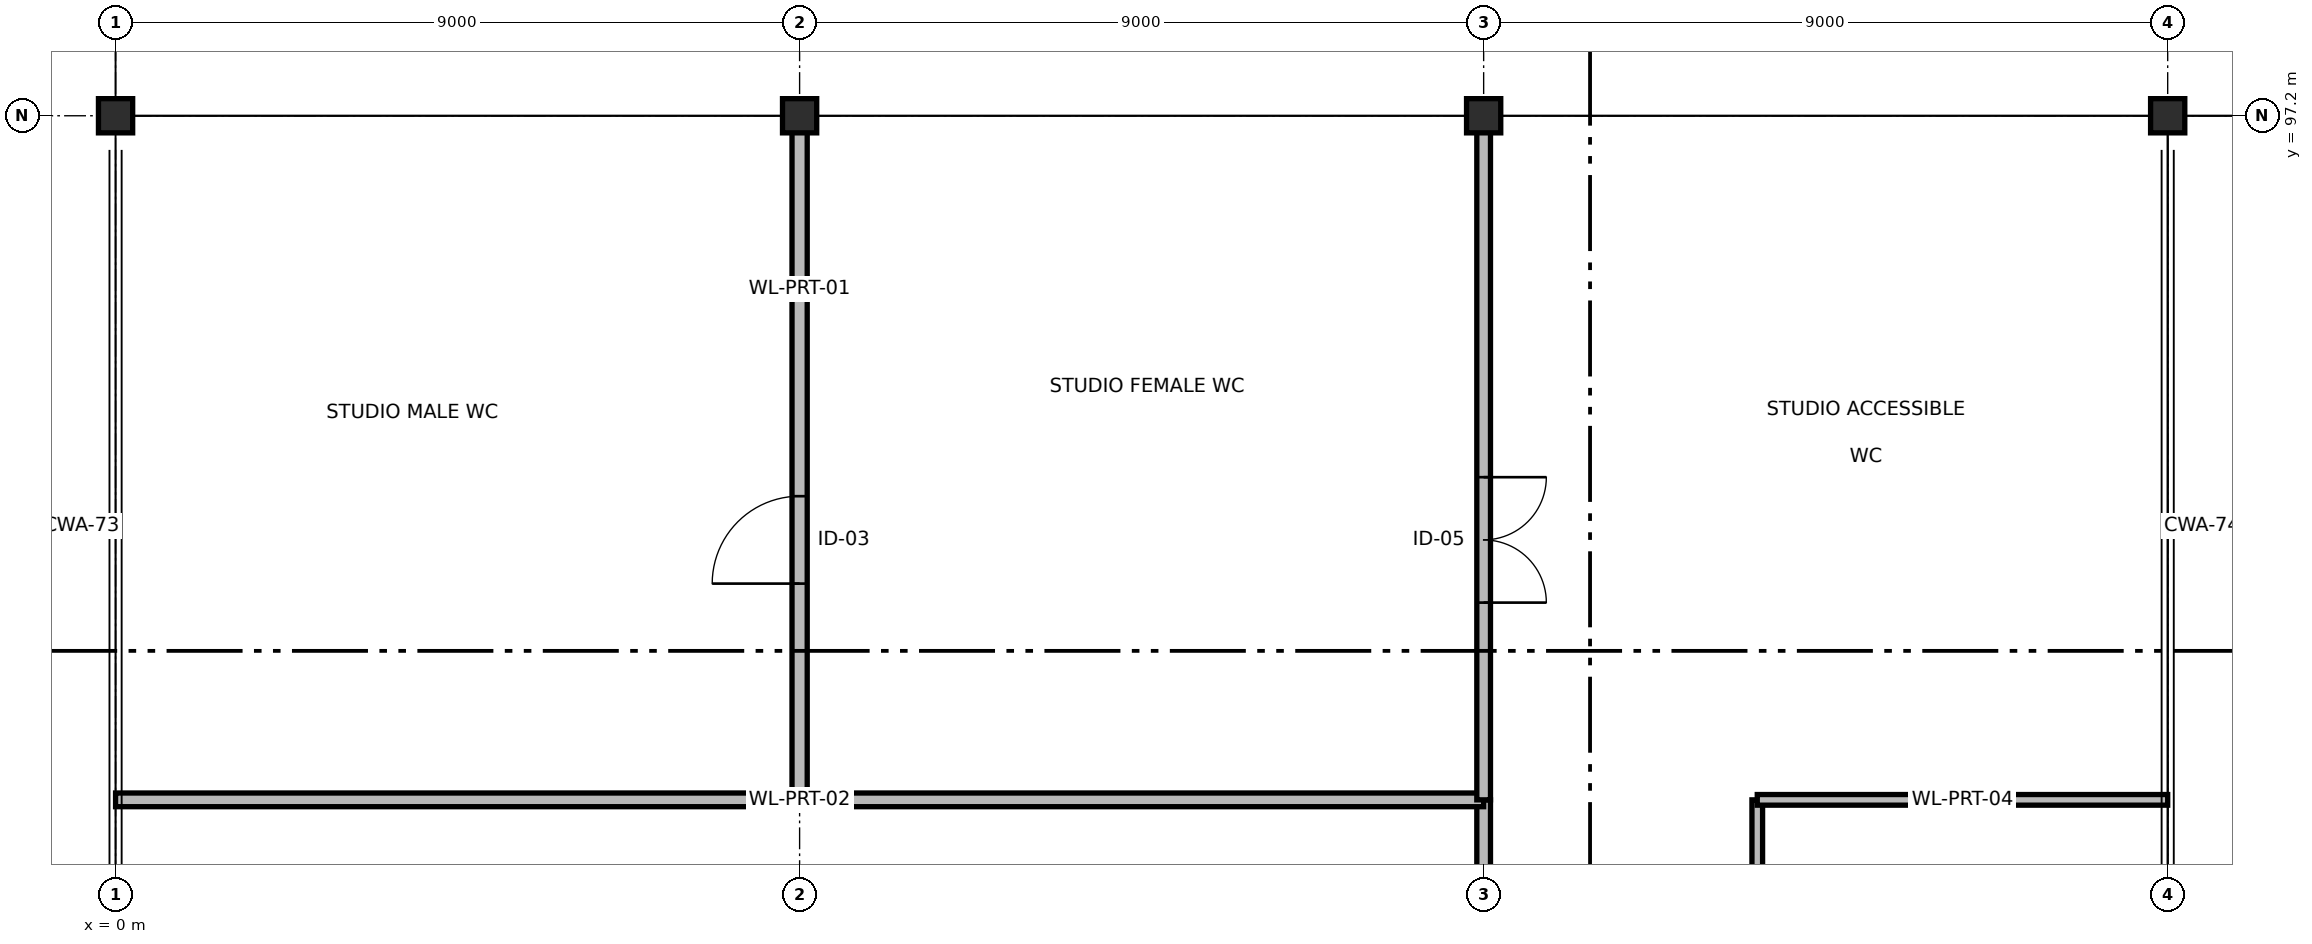
"""IFC4 building model, lengths in metres.
Left out: names, types, materials, properties, quantities, classifications, styles, units other than length and angle.
Written with IfcOpenShell. Run it as: python <this file> out.ifc"""

import sys

from ifc_helpers import new_model, si_unit, direction, frame, frame_2d, origin, origin_2d, place, context, subcontext, project, spatial, rectangle, extrude, element, fill, save


model = new_model("IFC4")
c1 = context("Model", 3, precision=1e-05, world=origin(), true_north=direction((0.0, 1.0)))
c2 = subcontext(c1, "Body", "Model", "MODEL_VIEW")
j1 = project(units=[si_unit("LENGTHUNIT", "METRE"), si_unit("PLANEANGLEUNIT", "RADIAN")], contexts=[c1])
p1 = place(None, origin())
s1 = spatial("IfcSite", under=j1, at=p1, CompositionType="ELEMENT")
p2 = place(p1, origin())
s2 = spatial("IfcBuilding", under=s1, at=p2, CompositionType="ELEMENT")
p3 = place(p2, frame((0.0, 0.0, 14.1)))
s3 = spatial("IfcBuildingStorey", under=s2, at=p3, CompositionType="ELEMENT", Elevation=14.1)
for number, where, z_axis, x_axis in (
    (1, (0.0, 97.2, 0.0), (0.0, 0.0, 1.0), (1.0, 0.0, 0.0)),
    (2, (9.0, 97.2, 0.0), (0.0, 0.0, 1.0), (1.0, 0.0, 0.0)),
    (3, (18.0, 97.2, 0.0), (0.0, 0.0, 1.0), (1.0, 0.0, 0.0)),
    (4, (27.0, 97.2, 0.0), (0.0, 0.0, 1.0), (1.0, 0.0, 0.0)),
):
    element("IfcColumn", number, at=place(p3, frame(where, z_axis=z_axis, x_axis=x_axis)), inside=s3, PredefinedType="COLUMN", context=c2, shape_type="SweptSolid", body=[
        extrude(rectangle(XDim=0.45, YDim=0.45, at=origin_2d()), origin(), (0.0, 0.0, 1.0), 4.5),
    ])
p4 = place(p3, frame((18.0, 68.4, 0.0), z_axis=(0.0, 0.0, 1.0), x_axis=(0.0, 1.0, 0.0)))
e5 = element("IfcWall", 5, at=p4, inside=s3, PredefinedType="PARTITIONING", context=c2, shape_type="SweptSolid", body=[
    extrude(rectangle(XDim=19.8, YDim=0.18, at=frame_2d((9.9, 0.0))), origin(), (0.0, 0.0, 1.0), 3.485),
])
p5 = place(p4, frame((3.856, 0.0, 0.0)))
e6 = element("IfcOpeningElement", 6, at=p5, cuts=e5, PredefinedType="OPENING", context=c2, shape_type="SweptSolid", body=[
    extrude(rectangle(XDim=1.0, YDim=2.1, at=frame_2d((0.5, 1.05))), frame((0.0, 0.1, 0.0), z_axis=(0.0, -1.0, 0.0), x_axis=(1.0, 0.0, 0.0)), (0.0, 0.0, 1.0), 0.2),
])
p6 = place(p3, frame((0.0, 88.2, 0.0), z_axis=(0.0, 0.0, 1.0), x_axis=(1.0, 0.0, 0.0)))
e7 = element("IfcWall", 7, at=p6, inside=s3, PredefinedType="PARTITIONING", context=c2, shape_type="SweptSolid", body=[
    extrude(rectangle(XDim=18.0, YDim=0.18, at=frame_2d((9.0, 0.0))), origin(), (0.0, 0.0, 1.0), 3.485),
])
p7 = place(p3, frame((21.6, 71.6, 0.0), z_axis=(0.0, 0.0, 1.0), x_axis=(0.0, 1.0, 0.0)))
e8 = element("IfcWall", 8, at=p7, inside=s3, PredefinedType="PARTITIONING", context=c2, shape_type="SweptSolid", body=[
    extrude(rectangle(XDim=16.6, YDim=0.14, at=frame_2d((8.3, 0.0))), origin(), (0.0, 0.0, 1.0), 3.585),
])
p8 = place(p7, frame((9.817, 0.0, 0.0)))
e9 = element("IfcOpeningElement", 9, at=p8, cuts=e8, PredefinedType="OPENING", context=c2, shape_type="SweptSolid", body=[
    extrude(rectangle(XDim=0.95, YDim=2.1, at=frame_2d((0.475, 1.05))), frame((0.0, 0.08, 0.0), z_axis=(0.0, -1.0, 0.0), x_axis=(1.0, 0.0, 0.0)), (0.0, 0.0, 1.0), 0.16),
])
p9 = place(p3, frame((21.6, 88.2, 0.0), z_axis=(0.0, 0.0, 1.0), x_axis=(1.0, 0.0, 0.0)))
e10 = element("IfcWall", 10, at=p9, inside=s3, PredefinedType="PARTITIONING", context=c2, shape_type="SweptSolid", body=[
    extrude(rectangle(XDim=5.4, YDim=0.14, at=frame_2d((2.7, 0.0))), origin(), (0.0, 0.0, 1.0), 3.535),
])
p10 = place(p3, frame((9.0, 88.2, 0.0), z_axis=(0.0, 0.0, 1.0), x_axis=(0.0, 1.0, 0.0)))
e11 = element("IfcWall", 11, at=p10, inside=s3, PredefinedType="PARTITIONING", context=c2, shape_type="SweptSolid", body=[
    extrude(rectangle(XDim=9.0, YDim=0.2, at=frame_2d((4.5, 0.0))), origin(), (0.0, 0.0, 1.0), 3.485),
])
p11 = place(p10, frame((2.845, 0.0, 0.0)))
e12 = element("IfcOpeningElement", 12, at=p11, cuts=e11, PredefinedType="OPENING", context=c2, shape_type="SweptSolid", body=[
    extrude(rectangle(XDim=1.15, YDim=2.2, at=frame_2d((0.575, 1.1))), frame((0.0, 0.11, 0.0), z_axis=(0.0, -1.0, 0.0), x_axis=(1.0, 0.0, 0.0)), (0.0, 0.0, 1.0), 0.22),
])
p12 = place(p3, frame((18.0, 88.2, 0.0), z_axis=(0.0, 0.0, 1.0), x_axis=(0.0, 1.0, 0.0)))
e13 = element("IfcWall", 13, at=p12, inside=s3, PredefinedType="PARTITIONING", context=c2, shape_type="SweptSolid", body=[
    extrude(rectangle(XDim=9.0, YDim=0.18, at=frame_2d((4.5, 0.0))), origin(), (0.0, 0.0, 1.0), 3.485),
])
p13 = place(p12, frame((2.595, 0.0, 0.0)))
e14 = element("IfcOpeningElement", 14, at=p13, cuts=e13, PredefinedType="OPENING", context=c2, shape_type="SweptSolid", body=[
    extrude(rectangle(XDim=1.65, YDim=2.2, at=frame_2d((0.825, 1.1))), frame((0.0, 0.1, 0.0), z_axis=(0.0, -1.0, 0.0), x_axis=(1.0, 0.0, 0.0)), (0.0, 0.0, 1.0), 0.2),
])
p14 = place(p11, origin())
e15 = element("IfcDoor", 15, at=p14, inside=s3, OperationType="SINGLE_SWING_LEFT", PredefinedType="DOOR", context=c2, shape_type="SweptSolid", body=[
    extrude(rectangle(XDim=1.15, YDim=2.2, at=frame_2d((0.575, 1.1))), frame((0.0, 0.025, 0.0), z_axis=(0.0, -1.0, 0.0), x_axis=(1.0, 0.0, 0.0)), (0.0, 0.0, 1.0), 0.05),
])
fill(e12, e15)
p15 = place(p13, origin())
e16 = element("IfcDoor", 16, at=p15, inside=s3, OperationType="DOUBLE_DOOR_SINGLE_SWING", PredefinedType="DOOR", context=c2, shape_type="SweptSolid", body=[
    extrude(rectangle(XDim=1.65, YDim=2.2, at=frame_2d((0.825, 1.1))), frame((0.0, 0.025, 0.0), z_axis=(0.0, -1.0, 0.0), x_axis=(1.0, 0.0, 0.0)), (0.0, 0.0, 1.0), 0.05),
])
fill(e14, e16)
save(model, sys.argv[1])
